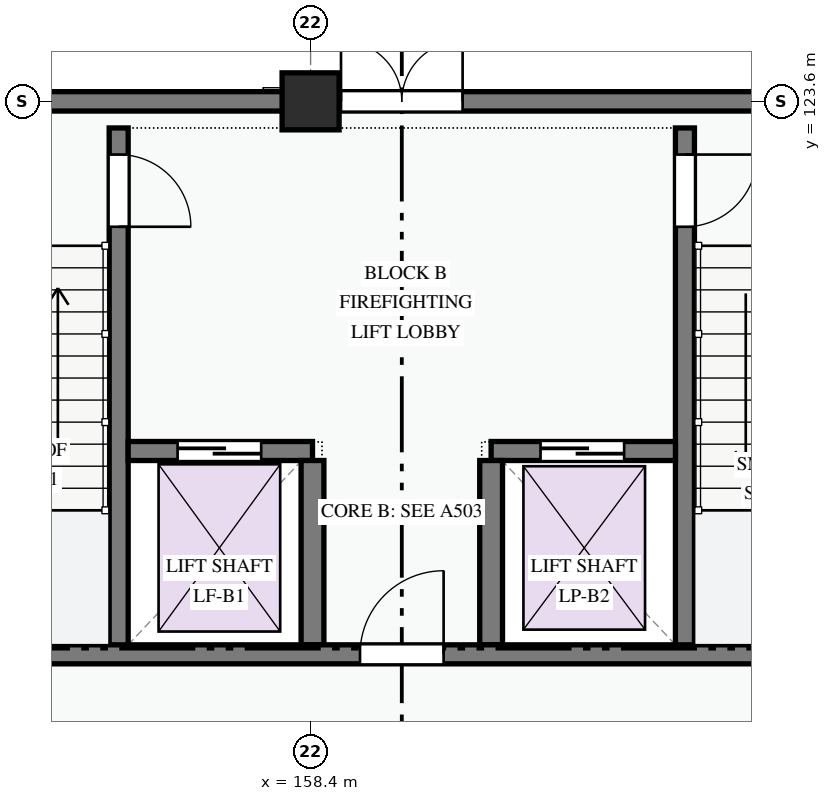
"""IFC4 building model, lengths in metres.
Left out: names, types, materials, properties, quantities, classifications, styles, units other than length and angle.
Written with IfcOpenShell. Run it as: python <this file> out.ifc"""

import sys

from ifc_helpers import new_model, si_unit, direction, frame, frame_2d, origin, origin_2d, place, context, subcontext, project, spatial, rectangle, extrude, element, fill, save


model = new_model("IFC4")
c1 = context("Model", 3, precision=1e-05, world=origin(), true_north=direction((0.0, 1.0)))
c2 = subcontext(c1, "Body", "Model", "MODEL_VIEW")
j1 = project(units=[si_unit("LENGTHUNIT", "METRE"), si_unit("PLANEANGLEUNIT", "RADIAN")], contexts=[c1])
p1 = place(None, origin())
s1 = spatial("IfcSite", under=j1, at=p1, CompositionType="ELEMENT")
p2 = place(p1, origin())
s2 = spatial("IfcBuilding", under=s1, at=p2, CompositionType="ELEMENT")
p3 = place(p2, origin())
s3 = spatial("IfcBuildingStorey", under=s2, at=p3, CompositionType="ELEMENT", Elevation=0.0)
p4 = place(p3, frame((158.4, 123.6, 0.0), z_axis=(0.0, 0.0, 1.0), x_axis=(1.0, 0.0, 0.0)))
e1 = element("IfcColumn", 1, at=p4, inside=s3, PredefinedType="COLUMN", context=c2, shape_type="SweptSolid", body=[
    extrude(rectangle(XDim=0.75, YDim=0.75, at=origin_2d()), origin(), (0.0, 0.0, 1.0), 4.5),
])
p5 = place(p3, frame((166.8, 123.6, 0.0), z_axis=(0.0, 0.0, 1.0), x_axis=(-1.0, 0.0, 0.0)))
e2 = element("IfcWall", 2, at=p5, inside=s3, PredefinedType="STANDARD", context=c2, shape_type="SweptSolid", body=[
    extrude(rectangle(XDim=8.4, YDim=0.255, at=frame_2d((4.2, 0.0))), origin(), (0.0, 0.0, 1.0), 4.2),
])
p6 = place(p5, frame((6.4, 0.0, 0.0)))
e3 = element("IfcOpeningElement", 3, at=p6, cuts=e2, PredefinedType="OPENING", context=c2, shape_type="SweptSolid", body=[
    extrude(rectangle(XDim=1.6, YDim=2.35, at=frame_2d((0.8, 1.175))), frame((0.0, 0.137, 0.0), z_axis=(0.0, -1.0, 0.0), x_axis=(1.0, 0.0, 0.0)), (0.0, 0.0, 1.0), 0.275),
])
p7 = place(p5, frame((1.25, 0.0, 0.0)))
e4 = element("IfcOpeningElement", 4, at=p7, cuts=e2, PredefinedType="OPENING", context=c2, shape_type="SweptSolid", body=[
    extrude(rectangle(XDim=1.3, YDim=2.2, at=frame_2d((0.65, 1.1))), frame((0.0, 0.137, 0.0), z_axis=(0.0, -1.0, 0.0), x_axis=(1.0, 0.0, 0.0)), (0.0, 0.0, 1.0), 0.275),
])
p8 = place(p3, frame((158.4, 123.6, 0.0), z_axis=(0.0, 0.0, 1.0), x_axis=(-1.0, 0.0, 0.0)))
e5 = element("IfcWall", 5, at=p8, inside=s3, PredefinedType="STANDARD", context=c2, shape_type="SweptSolid", body=[
    extrude(rectangle(XDim=6.0, YDim=0.255, at=frame_2d((3.0, 0.0))), origin(), (0.0, 0.0, 1.0), 4.2),
])
p9 = place(p8, frame((3.5, 0.0, 0.0)))
e6 = element("IfcOpeningElement", 6, at=p9, cuts=e5, PredefinedType="OPENING", context=c2, shape_type="SweptSolid", body=[
    extrude(rectangle(XDim=1.2, YDim=2.2, at=frame_2d((0.6, 1.1))), frame((0.0, 0.137, 0.0), z_axis=(0.0, -1.0, 0.0), x_axis=(1.0, 0.0, 0.0)), (0.0, 0.0, 1.0), 0.275),
])
p10 = place(p3, frame((155.875, 123.25, 0.0), z_axis=(0.0, 0.0, 1.0), x_axis=(0.0, -1.0, 0.0)))
e7 = element("IfcWall", 7, at=p10, inside=s3, PredefinedType="SHEAR", context=c2, shape_type="SweptSolid", body=[
    extrude(rectangle(XDim=6.925, YDim=0.25, at=frame_2d((3.462, 0.0))), origin(), (0.0, 0.0, 1.0), 4.2),
])
p11 = place(p10, frame((0.35, 0.0, 0.0)))
e8 = element("IfcOpeningElement", 8, at=p11, cuts=e7, PredefinedType="OPENING", context=c2, shape_type="SweptSolid", body=[
    extrude(rectangle(XDim=0.95, YDim=2.1, at=frame_2d((0.475, 1.05))), frame((0.0, 0.135, 0.0), z_axis=(0.0, -1.0, 0.0), x_axis=(1.0, 0.0, 0.0)), (0.0, 0.0, 1.0), 0.27),
])
p12 = place(p3, frame((163.325, 123.25, 0.0), z_axis=(0.0, 0.0, 1.0), x_axis=(0.0, -1.0, 0.0)))
e9 = element("IfcWall", 9, at=p12, inside=s3, PredefinedType="SHEAR", context=c2, shape_type="SweptSolid", body=[
    extrude(rectangle(XDim=6.925, YDim=0.25, at=frame_2d((3.462, 0.0))), origin(), (0.0, 0.0, 1.0), 4.2),
])
p13 = place(p12, frame((0.35, 0.0, 0.0)))
e10 = element("IfcOpeningElement", 10, at=p13, cuts=e9, PredefinedType="OPENING", context=c2, shape_type="SweptSolid", body=[
    extrude(rectangle(XDim=0.95, YDim=2.1, at=frame_2d((0.475, 1.05))), frame((0.0, 0.135, 0.0), z_axis=(0.0, -1.0, 0.0), x_axis=(1.0, 0.0, 0.0)), (0.0, 0.0, 1.0), 0.27),
])
p14 = place(p3, frame((156.0, 119.0, 0.0), z_axis=(0.0, 0.0, 1.0), x_axis=(1.0, 0.0, 0.0)))
e11 = element("IfcWall", 11, at=p14, inside=s3, PredefinedType="SHEAR", context=c2, shape_type="SweptSolid", body=[
    extrude(rectangle(XDim=2.425, YDim=0.25, at=frame_2d((1.212, 0.0))), origin(), (0.0, 0.0, 1.0), 4.2),
])
p15 = place(p14, frame((0.65, 0.0, 0.0)))
e12 = element("IfcOpeningElement", 12, at=p15, cuts=e11, PredefinedType="OPENING", context=c2, shape_type="SweptSolid", body=[
    extrude(rectangle(XDim=1.1, YDim=2.15, at=frame_2d((0.55, 1.075))), frame((0.0, 0.135, 0.0), z_axis=(0.0, -1.0, 0.0), x_axis=(1.0, 0.0, 0.0)), (0.0, 0.0, 1.0), 0.27),
])
p16 = place(p3, frame((160.775, 119.0, 0.0), z_axis=(0.0, 0.0, 1.0), x_axis=(1.0, 0.0, 0.0)))
e13 = element("IfcWall", 13, at=p16, inside=s3, PredefinedType="SHEAR", context=c2, shape_type="SweptSolid", body=[
    extrude(rectangle(XDim=2.425, YDim=0.25, at=frame_2d((1.212, 0.0))), origin(), (0.0, 0.0, 1.0), 4.2),
])
p17 = place(p16, frame((0.65, 0.0, 0.0)))
e14 = element("IfcOpeningElement", 14, at=p17, cuts=e13, PredefinedType="OPENING", context=c2, shape_type="SweptSolid", body=[
    extrude(rectangle(XDim=1.1, YDim=2.15, at=frame_2d((0.55, 1.075))), frame((0.0, 0.135, 0.0), z_axis=(0.0, -1.0, 0.0), x_axis=(1.0, 0.0, 0.0)), (0.0, 0.0, 1.0), 0.27),
])
for number, where, z_axis, x_axis in (
    (15, (158.425, 118.875, 0.0), (0.0, 0.0, 1.0), (0.0, -1.0, 0.0)),
    (16, (160.775, 118.875, 0.0), (0.0, 0.0, 1.0), (0.0, -1.0, 0.0)),
):
    element("IfcWall", number, at=place(p3, frame(where, z_axis=z_axis, x_axis=x_axis)), inside=s3, PredefinedType="SHEAR", context=c2, shape_type="SweptSolid", body=[
        extrude(rectangle(XDim=2.425, YDim=0.3, at=frame_2d((1.212, 0.0))), origin(), (0.0, 0.0, 1.0), 4.2),
    ])
p18 = place(p3, frame((152.85, 116.325, 0.0), z_axis=(0.0, 0.0, 1.0), x_axis=(1.0, 0.0, 0.0)))
e17 = element("IfcWall", 17, at=p18, inside=s3, PredefinedType="SHEAR", context=c2, shape_type="SweptSolid", body=[
    extrude(rectangle(XDim=13.5, YDim=0.25, at=frame_2d((6.75, 0.0))), origin(), (0.0, 0.0, 1.0), 4.2),
])
p19 = place(p18, frame((6.2, 0.0, 0.0)))
e18 = element("IfcOpeningElement", 18, at=p19, cuts=e17, PredefinedType="OPENING", context=c2, shape_type="SweptSolid", body=[
    extrude(rectangle(XDim=1.1, YDim=2.15, at=frame_2d((0.55, 1.075))), frame((0.0, 0.135, 0.0), z_axis=(0.0, -1.0, 0.0), x_axis=(1.0, 0.0, 0.0)), (0.0, 0.0, 1.0), 0.27),
])
p20 = place(p6, frame((1.6, 0.0, 0.0), z_axis=(0.0, 0.0, 1.0), x_axis=(-1.0, 0.0, 0.0)))
e19 = element("IfcDoor", 19, at=p20, inside=s3, OperationType="DOUBLE_DOOR_SINGLE_SWING", PredefinedType="DOOR", context=c2, shape_type="SweptSolid", body=[
    extrude(rectangle(XDim=1.6, YDim=2.35, at=frame_2d((0.8, 1.175))), frame((0.0, 0.025, 0.0), z_axis=(0.0, -1.0, 0.0), x_axis=(1.0, 0.0, 0.0)), (0.0, 0.0, 1.0), 0.05),
])
fill(e3, e19)
p21 = place(p11, origin())
e20 = element("IfcDoor", 20, at=p21, inside=s3, OperationType="SINGLE_SWING_RIGHT", PredefinedType="DOOR", context=c2, shape_type="SweptSolid", body=[
    extrude(rectangle(XDim=0.95, YDim=2.1, at=frame_2d((0.475, 1.05))), frame((0.0, 0.025, 0.0), z_axis=(0.0, -1.0, 0.0), x_axis=(1.0, 0.0, 0.0)), (0.0, 0.0, 1.0), 0.05),
])
fill(e8, e20)
p22 = place(p13, origin())
e21 = element("IfcDoor", 21, at=p22, inside=s3, OperationType="SINGLE_SWING_LEFT", PredefinedType="DOOR", context=c2, shape_type="SweptSolid", body=[
    extrude(rectangle(XDim=0.95, YDim=2.1, at=frame_2d((0.475, 1.05))), frame((0.0, 0.025, 0.0), z_axis=(0.0, -1.0, 0.0), x_axis=(1.0, 0.0, 0.0)), (0.0, 0.0, 1.0), 0.05),
])
fill(e10, e21)
p23 = place(p15, origin())
e22 = element("IfcDoor", 22, at=p23, inside=s3, OperationType="SLIDING_TO_LEFT", PredefinedType="DOOR", context=c2, shape_type="SweptSolid", body=[
    extrude(rectangle(XDim=1.1, YDim=2.15, at=frame_2d((0.55, 1.075))), frame((0.0, 0.025, 0.0), z_axis=(0.0, -1.0, 0.0), x_axis=(1.0, 0.0, 0.0)), (0.0, 0.0, 1.0), 0.05),
])
fill(e12, e22)
p24 = place(p17, origin())
e23 = element("IfcDoor", 23, at=p24, inside=s3, OperationType="SLIDING_TO_LEFT", PredefinedType="DOOR", context=c2, shape_type="SweptSolid", body=[
    extrude(rectangle(XDim=1.1, YDim=2.15, at=frame_2d((0.55, 1.075))), frame((0.0, 0.025, 0.0), z_axis=(0.0, -1.0, 0.0), x_axis=(1.0, 0.0, 0.0)), (0.0, 0.0, 1.0), 0.05),
])
fill(e14, e23)
p25 = place(p19, origin())
e24 = element("IfcDoor", 24, at=p25, inside=s3, OperationType="SINGLE_SWING_RIGHT", PredefinedType="DOOR", context=c2, shape_type="SweptSolid", body=[
    extrude(rectangle(XDim=1.1, YDim=2.15, at=frame_2d((0.55, 1.075))), frame((0.0, 0.025, 0.0), z_axis=(0.0, -1.0, 0.0), x_axis=(1.0, 0.0, 0.0)), (0.0, 0.0, 1.0), 0.05),
])
fill(e18, e24)
save(model, sys.argv[1])
